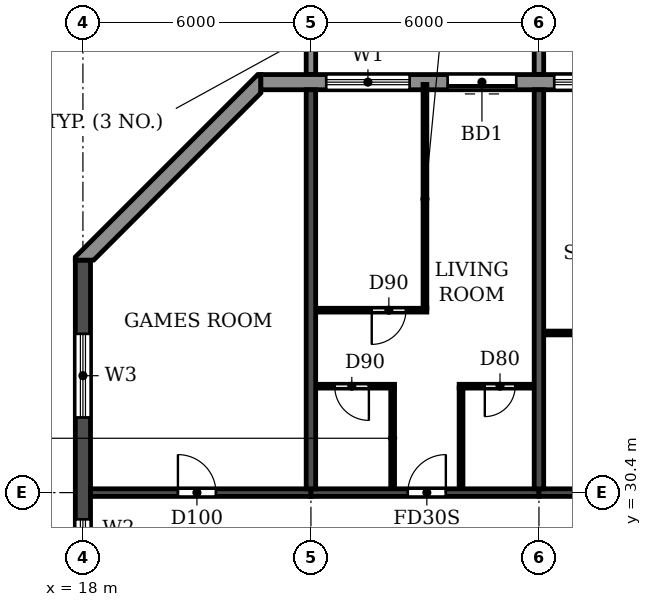
"""IFC4 building model, lengths in metres.
Left out: names, types, materials, properties, quantities, classifications, styles, units other than length and angle.
Written with IfcOpenShell. Run it as: python <this file> out.ifc"""

import sys

from ifc_helpers import new_model, si_unit, direction, frame, frame_2d, origin, place, context, subcontext, project, spatial, polyline, rectangle, outline, extrude, source, transform, mapped, element, fill, save


model = new_model("IFC4")
c1 = context("Model", 3, precision=1e-05, world=origin(), true_north=direction((0.0, 1.0)))
c2 = subcontext(c1, "Body", "Model", "MODEL_VIEW")
j1 = project(units=[si_unit("LENGTHUNIT", "METRE"), si_unit("PLANEANGLEUNIT", "RADIAN")], contexts=[c1])
p1 = place(None, origin())
s1 = spatial("IfcSite", under=j1, at=p1, CompositionType="ELEMENT")
p2 = place(p1, origin())
s2 = spatial("IfcBuilding", under=s1, at=p2, CompositionType="ELEMENT")
p3 = place(p2, frame((0.0, 0.0, 208.2)))
s3 = spatial("IfcBuildingStorey", under=s2, at=p3, CompositionType="ELEMENT", Elevation=208.2)
for number, where, z_axis, x_axis in (
    (1, (24.0, 30.5, 0.0), (0.0, 0.0, 1.0), (0.0, 1.0, 0.0)),
    (2, (30.0, 30.5, 0.0), (0.0, 0.0, 1.0), (0.0, 1.0, 0.0)),
):
    element("IfcWall", number, at=place(p3, frame(where, z_axis=z_axis, x_axis=x_axis)), inside=s3, PredefinedType="SHEAR", context=c2, shape_type="SweptSolid", body=[
        extrude(rectangle(XDim=10.5, YDim=0.25, at=frame_2d((5.25, 0.0))), origin(), (0.0, 0.0, 1.0), 3.0),
    ])
p4 = place(p3, frame((18.0, 4.683, 0.0), z_axis=(0.0, 0.0, 1.0), x_axis=(0.0, 1.0, 0.0)))
e3 = element("IfcWall", 3, at=p4, inside=s3, PredefinedType="SHEAR", context=c2, shape_type="SweptSolid", body=[
    extrude(rectangle(XDim=31.834, YDim=0.4, at=frame_2d((15.917, 0.0))), origin(), (0.0, 0.0, 1.0), 3.0),
])
p5 = place(p4, frame((23.817, 0.0, 0.9)))
e4 = element("IfcOpeningElement", 4, at=p5, cuts=e3, PredefinedType="OPENING", context=c2, shape_type="SweptSolid", body=[
    extrude(rectangle(XDim=1.2, YDim=1.5, at=frame_2d((0.6, 0.75))), frame((0.0, 0.21, 0.0), z_axis=(0.0, -1.0, 0.0), x_axis=(1.0, 0.0, 0.0)), (0.0, 0.0, 1.0), 0.42),
])
p6 = place(p4, frame((8.017, 0.0, 0.9)))
e5 = element("IfcOpeningElement", 5, at=p6, cuts=e3, PredefinedType="OPENING", context=c2, shape_type="SweptSolid", body=[
    extrude(rectangle(XDim=1.2, YDim=1.5, at=frame_2d((0.6, 0.75))), frame((0.0, 0.21, 0.0), z_axis=(0.0, -1.0, 0.0), x_axis=(1.0, 0.0, 0.0)), (0.0, 0.0, 1.0), 0.42),
])
p7 = place(p4, frame((27.694, 0.0, 0.6)))
e6 = element("IfcOpeningElement", 6, at=p7, cuts=e3, PredefinedType="OPENING", context=c2, shape_type="SweptSolid", body=[
    extrude(rectangle(XDim=2.2, YDim=1.8, at=frame_2d((1.1, 0.9))), frame((0.0, 0.21, 0.0), z_axis=(0.0, -1.0, 0.0), x_axis=(1.0, 0.0, 0.0)), (0.0, 0.0, 1.0), 0.42),
])
p8 = place(p4, frame((2.541, 0.0, 0.6)))
e7 = element("IfcOpeningElement", 7, at=p8, cuts=e3, PredefinedType="OPENING", context=c2, shape_type="SweptSolid", body=[
    extrude(rectangle(XDim=2.2, YDim=1.8, at=frame_2d((1.1, 0.9))), frame((0.0, 0.21, 0.0), z_axis=(0.0, -1.0, 0.0), x_axis=(1.0, 0.0, 0.0)), (0.0, 0.0, 1.0), 0.42),
])
p9 = place(p4, frame((15.917, 0.0, 0.9)))
e8 = element("IfcOpeningElement", 8, at=p9, cuts=e3, PredefinedType="OPENING", context=c2, shape_type="SweptSolid", body=[
    extrude(rectangle(XDim=1.2, YDim=1.5, at=frame_2d((0.6, 0.75))), frame((0.0, 0.21, 0.0), z_axis=(0.0, -1.0, 0.0), x_axis=(1.0, 0.0, 0.0)), (0.0, 0.0, 1.0), 0.42),
])
p10 = place(p3, frame((18.2, 30.4, 0.0), z_axis=(0.0, 0.0, 1.0), x_axis=(1.0, 0.0, 0.0)))
e9 = element("IfcWall", 9, at=p10, inside=s3, PredefinedType="SHEAR", context=c2, shape_type="SweptSolid", body=[
    extrude(rectangle(XDim=5.8, YDim=0.2, at=frame_2d((2.9, 0.0))), origin(), (0.0, 0.0, 1.0), 2.4),
])
p11 = place(p10, frame((2.3, 0.0, 0.0)))
e10 = element("IfcOpeningElement", 10, at=p11, cuts=e9, PredefinedType="OPENING", context=c2, shape_type="SweptSolid", body=[
    extrude(rectangle(XDim=1.0, YDim=2.1, at=frame_2d((0.5, 1.05))), frame((0.0, 0.11, 0.0), z_axis=(0.0, -1.0, 0.0), x_axis=(1.0, 0.0, 0.0)), (0.0, 0.0, 1.0), 0.22),
])
p12 = place(p3, frame((24.0, 30.4, 0.0), z_axis=(0.0, 0.0, 1.0), x_axis=(1.0, 0.0, 0.0)))
e11 = element("IfcWall", 11, at=p12, inside=s3, PredefinedType="SHEAR", context=c2, shape_type="SweptSolid", body=[
    extrude(rectangle(XDim=6.0, YDim=0.2, at=frame_2d((3.0, 0.0))), origin(), (0.0, 0.0, 1.0), 2.4),
])
p13 = place(p12, frame((2.55, 0.0, 0.0)))
e12 = element("IfcOpeningElement", 12, at=p13, cuts=e11, PredefinedType="OPENING", context=c2, shape_type="SweptSolid", body=[
    extrude(rectangle(XDim=1.0, YDim=2.1, at=frame_2d((0.5, 1.05))), frame((0.0, 0.11, 0.0), z_axis=(0.0, -1.0, 0.0), x_axis=(1.0, 0.0, 0.0)), (0.0, 0.0, 1.0), 0.22),
])
p14 = place(p3, frame((30.0, 30.4, 0.0), z_axis=(0.0, 0.0, 1.0), x_axis=(1.0, 0.0, 0.0)))
e13 = element("IfcWall", 13, at=p14, inside=s3, PredefinedType="SHEAR", context=c2, shape_type="SweptSolid", body=[
    extrude(rectangle(XDim=6.0, YDim=0.2, at=frame_2d((3.0, 0.0))), origin(), (0.0, 0.0, 1.0), 2.4),
])
p15 = place(p14, frame((2.45, 0.0, 0.0)))
e14 = element("IfcOpeningElement", 14, at=p15, cuts=e13, PredefinedType="OPENING", context=c2, shape_type="SweptSolid", body=[
    extrude(rectangle(XDim=1.0, YDim=2.1, at=frame_2d((0.5, 1.05))), frame((0.0, 0.11, 0.0), z_axis=(0.0, -1.0, 0.0), x_axis=(1.0, 0.0, 0.0)), (0.0, 0.0, 1.0), 0.22),
])
p16 = place(p3, frame((79.317, 41.2, 0.0), z_axis=(0.0, 0.0, 1.0), x_axis=(-1.0, 0.0, 0.0)))
e15 = element("IfcWall", 15, at=p16, inside=s3, PredefinedType="STANDARD", context=c2, shape_type="SweptSolid", body=[
    extrude(rectangle(XDim=56.634, YDim=0.4, at=frame_2d((28.317, 0.0))), origin(), (0.0, 0.0, 1.0), 3.0),
])
p17 = place(p16, frame((52.717, 0.0, 0.9)))
e16 = element("IfcOpeningElement", 16, at=p17, cuts=e15, PredefinedType="OPENING", context=c2, shape_type="SweptSolid", body=[
    extrude(rectangle(XDim=2.2, YDim=1.5, at=frame_2d((1.1, 0.75))), frame((0.0, 0.21, 0.0), z_axis=(0.0, -1.0, 0.0), x_axis=(1.0, 0.0, 0.0)), (0.0, 0.0, 1.0), 0.42),
])
p18 = place(p16, frame((49.917, 0.0, 0.0)))
e17 = element("IfcOpeningElement", 17, at=p18, cuts=e15, PredefinedType="OPENING", context=c2, shape_type="SweptSolid", body=[
    extrude(rectangle(XDim=1.8, YDim=2.4, at=frame_2d((0.9, 1.2))), frame((0.0, 0.21, 0.0), z_axis=(0.0, -1.0, 0.0), x_axis=(1.0, 0.0, 0.0)), (0.0, 0.0, 1.0), 0.42),
])
p19 = place(p16, frame((46.717, 0.0, 0.9)))
e18 = element("IfcOpeningElement", 18, at=p19, cuts=e15, PredefinedType="OPENING", context=c2, shape_type="SweptSolid", body=[
    extrude(rectangle(XDim=2.2, YDim=1.5, at=frame_2d((1.1, 0.75))), frame((0.0, 0.21, 0.0), z_axis=(0.0, -1.0, 0.0), x_axis=(1.0, 0.0, 0.0)), (0.0, 0.0, 1.0), 0.42),
])
p20 = place(p16, frame((43.917, 0.0, 0.0)))
e19 = element("IfcOpeningElement", 19, at=p20, cuts=e15, PredefinedType="OPENING", context=c2, shape_type="SweptSolid", body=[
    extrude(rectangle(XDim=1.8, YDim=2.4, at=frame_2d((0.9, 1.2))), frame((0.0, 0.21, 0.0), z_axis=(0.0, -1.0, 0.0), x_axis=(1.0, 0.0, 0.0)), (0.0, 0.0, 1.0), 0.42),
])
p21 = place(p16, frame((40.917, 0.0, 0.0)))
e20 = element("IfcOpeningElement", 20, at=p21, cuts=e15, PredefinedType="OPENING", context=c2, shape_type="SweptSolid", body=[
    extrude(rectangle(XDim=1.8, YDim=2.4, at=frame_2d((0.9, 1.2))), frame((0.0, 0.21, 0.0), z_axis=(0.0, -1.0, 0.0), x_axis=(1.0, 0.0, 0.0)), (0.0, 0.0, 1.0), 0.42),
])
p22 = place(p16, frame((37.717, 0.0, 0.9)))
e21 = element("IfcOpeningElement", 21, at=p22, cuts=e15, PredefinedType="OPENING", context=c2, shape_type="SweptSolid", body=[
    extrude(rectangle(XDim=2.2, YDim=1.5, at=frame_2d((1.1, 0.75))), frame((0.0, 0.21, 0.0), z_axis=(0.0, -1.0, 0.0), x_axis=(1.0, 0.0, 0.0)), (0.0, 0.0, 1.0), 0.42),
])
p23 = place(p16, frame((34.717, 0.0, 0.9)))
e22 = element("IfcOpeningElement", 22, at=p23, cuts=e15, PredefinedType="OPENING", context=c2, shape_type="SweptSolid", body=[
    extrude(rectangle(XDim=2.2, YDim=1.5, at=frame_2d((1.1, 0.75))), frame((0.0, 0.21, 0.0), z_axis=(0.0, -1.0, 0.0), x_axis=(1.0, 0.0, 0.0)), (0.0, 0.0, 1.0), 0.42),
])
p24 = place(p16, frame((31.717, 0.0, 0.9)))
e23 = element("IfcOpeningElement", 23, at=p24, cuts=e15, PredefinedType="OPENING", context=c2, shape_type="SweptSolid", body=[
    extrude(rectangle(XDim=2.2, YDim=1.5, at=frame_2d((1.1, 0.75))), frame((0.0, 0.21, 0.0), z_axis=(0.0, -1.0, 0.0), x_axis=(1.0, 0.0, 0.0)), (0.0, 0.0, 1.0), 0.42),
])
p25 = place(p16, frame((28.717, 0.0, 0.9)))
e24 = element("IfcOpeningElement", 24, at=p25, cuts=e15, PredefinedType="OPENING", context=c2, shape_type="SweptSolid", body=[
    extrude(rectangle(XDim=2.2, YDim=1.5, at=frame_2d((1.1, 0.75))), frame((0.0, 0.21, 0.0), z_axis=(0.0, -1.0, 0.0), x_axis=(1.0, 0.0, 0.0)), (0.0, 0.0, 1.0), 0.42),
])
p26 = place(p16, frame((25.917, 0.0, 0.0)))
e25 = element("IfcOpeningElement", 25, at=p26, cuts=e15, PredefinedType="OPENING", context=c2, shape_type="SweptSolid", body=[
    extrude(rectangle(XDim=1.8, YDim=2.4, at=frame_2d((0.9, 1.2))), frame((0.0, 0.21, 0.0), z_axis=(0.0, -1.0, 0.0), x_axis=(1.0, 0.0, 0.0)), (0.0, 0.0, 1.0), 0.42),
])
p27 = place(p16, frame((22.717, 0.0, 0.9)))
e26 = element("IfcOpeningElement", 26, at=p27, cuts=e15, PredefinedType="OPENING", context=c2, shape_type="SweptSolid", body=[
    extrude(rectangle(XDim=2.2, YDim=1.5, at=frame_2d((1.1, 0.75))), frame((0.0, 0.21, 0.0), z_axis=(0.0, -1.0, 0.0), x_axis=(1.0, 0.0, 0.0)), (0.0, 0.0, 1.0), 0.42),
])
p28 = place(p16, frame((19.717, 0.0, 0.9)))
e27 = element("IfcOpeningElement", 27, at=p28, cuts=e15, PredefinedType="OPENING", context=c2, shape_type="SweptSolid", body=[
    extrude(rectangle(XDim=2.2, YDim=1.5, at=frame_2d((1.1, 0.75))), frame((0.0, 0.21, 0.0), z_axis=(0.0, -1.0, 0.0), x_axis=(1.0, 0.0, 0.0)), (0.0, 0.0, 1.0), 0.42),
])
p29 = place(p16, frame((16.917, 0.0, 0.0)))
e28 = element("IfcOpeningElement", 28, at=p29, cuts=e15, PredefinedType="OPENING", context=c2, shape_type="SweptSolid", body=[
    extrude(rectangle(XDim=1.8, YDim=2.4, at=frame_2d((0.9, 1.2))), frame((0.0, 0.21, 0.0), z_axis=(0.0, -1.0, 0.0), x_axis=(1.0, 0.0, 0.0)), (0.0, 0.0, 1.0), 0.42),
])
p30 = place(p16, frame((13.717, 0.0, 0.9)))
e29 = element("IfcOpeningElement", 29, at=p30, cuts=e15, PredefinedType="OPENING", context=c2, shape_type="SweptSolid", body=[
    extrude(rectangle(XDim=2.2, YDim=1.5, at=frame_2d((1.1, 0.75))), frame((0.0, 0.21, 0.0), z_axis=(0.0, -1.0, 0.0), x_axis=(1.0, 0.0, 0.0)), (0.0, 0.0, 1.0), 0.42),
])
p31 = place(p16, frame((10.717, 0.0, 0.9)))
e30 = element("IfcOpeningElement", 30, at=p31, cuts=e15, PredefinedType="OPENING", context=c2, shape_type="SweptSolid", body=[
    extrude(rectangle(XDim=2.2, YDim=1.5, at=frame_2d((1.1, 0.75))), frame((0.0, 0.21, 0.0), z_axis=(0.0, -1.0, 0.0), x_axis=(1.0, 0.0, 0.0)), (0.0, 0.0, 1.0), 0.42),
])
p32 = place(p16, frame((7.717, 0.0, 0.9)))
e31 = element("IfcOpeningElement", 31, at=p32, cuts=e15, PredefinedType="OPENING", context=c2, shape_type="SweptSolid", body=[
    extrude(rectangle(XDim=2.2, YDim=1.5, at=frame_2d((1.1, 0.75))), frame((0.0, 0.21, 0.0), z_axis=(0.0, -1.0, 0.0), x_axis=(1.0, 0.0, 0.0)), (0.0, 0.0, 1.0), 0.42),
])
p33 = place(p16, frame((4.917, 0.0, 0.0)))
e32 = element("IfcOpeningElement", 32, at=p33, cuts=e15, PredefinedType="OPENING", context=c2, shape_type="SweptSolid", body=[
    extrude(rectangle(XDim=1.8, YDim=2.4, at=frame_2d((0.9, 1.2))), frame((0.0, 0.21, 0.0), z_axis=(0.0, -1.0, 0.0), x_axis=(1.0, 0.0, 0.0)), (0.0, 0.0, 1.0), 0.42),
])
p34 = place(p16, frame((1.717, 0.0, 0.9)))
e33 = element("IfcOpeningElement", 33, at=p34, cuts=e15, PredefinedType="OPENING", context=c2, shape_type="SweptSolid", body=[
    extrude(rectangle(XDim=2.2, YDim=1.5, at=frame_2d((1.1, 0.75))), frame((0.0, 0.21, 0.0), z_axis=(0.0, -1.0, 0.0), x_axis=(1.0, 0.0, 0.0)), (0.0, 0.0, 1.0), 0.42),
])
p35 = place(p3, origin())
e34 = element("IfcWall", 34, at=p35, inside=s3, PredefinedType="STANDARD", context=c2, shape_type="SweptSolid", body=[
    extrude(outline(polyline([(22.683, 41.4), (22.6, 41.4), (17.8, 36.6), (17.8, 36.517), (18.283, 36.517), (22.683, 40.917), (22.683, 41.4)])), origin(), (0.0, 0.0, 1.0), 3.0),
])
m1 = source(origin(), c2, "Body", "SweptSolid", [
    extrude(outline(polyline([(0.0, 0.0), (0.25, 0.0), (0.25, 3.1), (0.0, 3.1), (0.0, 0.0)])), origin(), (0.0, 0.0, 1.0), 3.1),
])
for number, where in (
    (35, (23.875, 41.4, 0.0)),
    (36, (29.875, 41.4, 0.0)),
):
    element("IfcWall", number, at=place(p3, frame(where)), inside=s3, PredefinedType="STANDARD", context=c2, shape_type="MappedRepresentation", body=[
        mapped(m1, transform((0.0, 0.0, 0.0))),
    ])
p36 = place(p3, frame((24.135, 33.2, 0.0), z_axis=(0.0, 0.0, 1.0), x_axis=(1.0, 0.0, 0.0)))
e37 = element("IfcWall", 37, at=p36, inside=s3, PredefinedType="PARTITIONING", context=c2, shape_type="SweptSolid", body=[
    extrude(rectangle(XDim=2.065, YDim=0.1, at=frame_2d((1.032, 0.0))), origin(), (0.0, 0.0, 1.0), 3.0),
])
p37 = place(p36, frame((0.49, 0.0, 0.0)))
e38 = element("IfcOpeningElement", 38, at=p37, cuts=e37, PredefinedType="OPENING", context=c2, shape_type="SweptSolid", body=[
    extrude(rectangle(XDim=0.9, YDim=2.1, at=frame_2d((0.45, 1.05))), frame((0.0, 0.06, 0.0), z_axis=(0.0, -1.0, 0.0), x_axis=(1.0, 0.0, 0.0)), (0.0, 0.0, 1.0), 0.12),
])
p38 = place(p3, frame((27.9, 33.2, 0.0), z_axis=(0.0, 0.0, 1.0), x_axis=(1.0, 0.0, 0.0)))
e39 = element("IfcWall", 39, at=p38, inside=s3, PredefinedType="PARTITIONING", context=c2, shape_type="SweptSolid", body=[
    extrude(rectangle(XDim=1.965, YDim=0.1, at=frame_2d((0.982, 0.0))), origin(), (0.0, 0.0, 1.0), 3.0),
])
p39 = place(p38, frame((0.675, 0.0, 0.0)))
e40 = element("IfcOpeningElement", 40, at=p39, cuts=e39, PredefinedType="OPENING", context=c2, shape_type="SweptSolid", body=[
    extrude(rectangle(XDim=0.8, YDim=2.1, at=frame_2d((0.4, 1.05))), frame((0.0, 0.06, 0.0), z_axis=(0.0, -1.0, 0.0), x_axis=(1.0, 0.0, 0.0)), (0.0, 0.0, 1.0), 0.12),
])
p40 = place(p3, frame((30.135, 34.6, 0.0), z_axis=(0.0, 0.0, 1.0), x_axis=(1.0, 0.0, 0.0)))
e41 = element("IfcWall", 41, at=p40, inside=s3, PredefinedType="PARTITIONING", context=c2, shape_type="SweptSolid", body=[
    extrude(rectangle(XDim=1.965, YDim=0.1, at=frame_2d((0.982, 0.0))), origin(), (0.0, 0.0, 1.0), 3.0),
])
p41 = place(p3, frame((24.135, 35.2, 0.0), z_axis=(0.0, 0.0, 1.0), x_axis=(1.0, 0.0, 0.0)))
e42 = element("IfcWall", 42, at=p41, inside=s3, PredefinedType="PARTITIONING", context=c2, shape_type="SweptSolid", body=[
    extrude(rectangle(XDim=2.915, YDim=0.1, at=frame_2d((1.458, 0.0))), origin(), (0.0, 0.0, 1.0), 3.0),
])
p42 = place(p41, frame((1.465, 0.0, 0.0)))
e43 = element("IfcOpeningElement", 43, at=p42, cuts=e42, PredefinedType="OPENING", context=c2, shape_type="SweptSolid", body=[
    extrude(rectangle(XDim=0.9, YDim=2.1, at=frame_2d((0.45, 1.05))), frame((0.0, 0.06, 0.0), z_axis=(0.0, -1.0, 0.0), x_axis=(1.0, 0.0, 0.0)), (0.0, 0.0, 1.0), 0.12),
])
p43 = place(p3, frame((26.15, 30.51, 0.0), z_axis=(0.0, 0.0, 1.0), x_axis=(0.0, 1.0, 0.0)))
e44 = element("IfcWall", 44, at=p43, inside=s3, PredefinedType="PARTITIONING", context=c2, shape_type="SweptSolid", body=[
    extrude(rectangle(XDim=2.64, YDim=0.1, at=frame_2d((1.32, 0.0))), origin(), (0.0, 0.0, 1.0), 3.0),
])
p44 = place(p3, frame((27.0, 35.25, 0.0), z_axis=(0.0, 0.0, 1.0), x_axis=(0.0, 1.0, 0.0)))
e45 = element("IfcWall", 45, at=p44, inside=s3, PredefinedType="PARTITIONING", context=c2, shape_type="SweptSolid", body=[
    extrude(rectangle(XDim=5.89, YDim=0.1, at=frame_2d((2.945, 0.0))), origin(), (0.0, 0.0, 1.0), 3.0),
])
p45 = place(p3, frame((27.95, 30.51, 0.0), z_axis=(0.0, 0.0, 1.0), x_axis=(0.0, 1.0, 0.0)))
e46 = element("IfcWall", 46, at=p45, inside=s3, PredefinedType="PARTITIONING", context=c2, shape_type="SweptSolid", body=[
    extrude(rectangle(XDim=2.64, YDim=0.1, at=frame_2d((1.32, 0.0))), origin(), (0.0, 0.0, 1.0), 3.0),
])
p46 = place(p17, origin())
e47 = element("IfcWindow", 47, at=p46, inside=s3, PartitioningType="DOUBLE_PANEL_HORIZONTAL", PredefinedType="WINDOW", context=c2, shape_type="SweptSolid", body=[
    extrude(rectangle(XDim=2.2, YDim=1.5, at=frame_2d((1.1, 0.75))), frame((0.0, 0.03, 0.0), z_axis=(0.0, -1.0, 0.0), x_axis=(1.0, 0.0, 0.0)), (0.0, 0.0, 1.0), 0.06),
])
fill(e16, e47)
p47 = place(p18, origin())
e48 = element("IfcDoor", 48, at=p47, inside=s3, OperationType="DOUBLE_DOOR_SLIDING", PredefinedType="DOOR", context=c2, shape_type="SweptSolid", body=[
    extrude(rectangle(XDim=1.8, YDim=2.4, at=frame_2d((0.9, 1.2))), frame((0.0, 0.025, 0.0), z_axis=(0.0, -1.0, 0.0), x_axis=(1.0, 0.0, 0.0)), (0.0, 0.0, 1.0), 0.05),
])
fill(e17, e48)
p48 = place(p19, origin())
e49 = element("IfcWindow", 49, at=p48, inside=s3, PartitioningType="DOUBLE_PANEL_HORIZONTAL", PredefinedType="WINDOW", context=c2, shape_type="SweptSolid", body=[
    extrude(rectangle(XDim=2.2, YDim=1.5, at=frame_2d((1.1, 0.75))), frame((0.0, 0.03, 0.0), z_axis=(0.0, -1.0, 0.0), x_axis=(1.0, 0.0, 0.0)), (0.0, 0.0, 1.0), 0.06),
])
fill(e18, e49)
p49 = place(p5, origin())
e50 = element("IfcWindow", 50, at=p49, inside=s3, PartitioningType="SINGLE_PANEL", PredefinedType="WINDOW", context=c2, shape_type="SweptSolid", body=[
    extrude(rectangle(XDim=1.2, YDim=1.5, at=frame_2d((0.6, 0.75))), frame((0.0, 0.03, 0.0), z_axis=(0.0, -1.0, 0.0), x_axis=(1.0, 0.0, 0.0)), (0.0, 0.0, 1.0), 0.06),
])
fill(e4, e50)
p50 = place(p7, origin())
e51 = element("IfcWindow", 51, at=p50, inside=s3, PartitioningType="DOUBLE_PANEL_HORIZONTAL", PredefinedType="WINDOW", context=c2, shape_type="SweptSolid", body=[
    extrude(rectangle(XDim=2.2, YDim=1.8, at=frame_2d((1.1, 0.9))), frame((0.0, 0.03, 0.0), z_axis=(0.0, -1.0, 0.0), x_axis=(1.0, 0.0, 0.0)), (0.0, 0.0, 1.0), 0.06),
])
fill(e6, e51)
p51 = place(p11, origin())
e52 = element("IfcDoor", 52, at=p51, inside=s3, OperationType="SINGLE_SWING_LEFT", PredefinedType="DOOR", context=c2, shape_type="SweptSolid", body=[
    extrude(rectangle(XDim=1.0, YDim=2.1, at=frame_2d((0.5, 1.05))), frame((0.0, 0.025, 0.0), z_axis=(0.0, -1.0, 0.0), x_axis=(1.0, 0.0, 0.0)), (0.0, 0.0, 1.0), 0.05),
])
fill(e10, e52)
p52 = place(p37, frame((0.9, 0.0, 0.0), z_axis=(0.0, 0.0, 1.0), x_axis=(-1.0, 0.0, 0.0)))
e53 = element("IfcDoor", 53, at=p52, inside=s3, OperationType="SINGLE_SWING_LEFT", PredefinedType="DOOR", context=c2, shape_type="SweptSolid", body=[
    extrude(rectangle(XDim=0.9, YDim=2.1, at=frame_2d((0.45, 1.05))), frame((0.0, 0.025, 0.0), z_axis=(0.0, -1.0, 0.0), x_axis=(1.0, 0.0, 0.0)), (0.0, 0.0, 1.0), 0.05),
])
fill(e38, e53)
p53 = place(p42, frame((0.9, 0.0, 0.0), z_axis=(0.0, 0.0, 1.0), x_axis=(-1.0, 0.0, 0.0)))
e54 = element("IfcDoor", 54, at=p53, inside=s3, OperationType="SINGLE_SWING_RIGHT", PredefinedType="DOOR", context=c2, shape_type="SweptSolid", body=[
    extrude(rectangle(XDim=0.9, YDim=2.1, at=frame_2d((0.45, 1.05))), frame((0.0, 0.025, 0.0), z_axis=(0.0, -1.0, 0.0), x_axis=(1.0, 0.0, 0.0)), (0.0, 0.0, 1.0), 0.05),
])
fill(e43, e54)
p54 = place(p13, origin())
e55 = element("IfcDoor", 55, at=p54, inside=s3, OperationType="SINGLE_SWING_RIGHT", PredefinedType="DOOR", context=c2, shape_type="SweptSolid", body=[
    extrude(rectangle(XDim=1.0, YDim=2.1, at=frame_2d((0.5, 1.05))), frame((0.0, 0.025, 0.0), z_axis=(0.0, -1.0, 0.0), x_axis=(1.0, 0.0, 0.0)), (0.0, 0.0, 1.0), 0.05),
])
fill(e12, e55)
p55 = place(p39, frame((0.8, 0.0, 0.0), z_axis=(0.0, 0.0, 1.0), x_axis=(-1.0, 0.0, 0.0)))
e56 = element("IfcDoor", 56, at=p55, inside=s3, OperationType="SINGLE_SWING_RIGHT", PredefinedType="DOOR", context=c2, shape_type="SweptSolid", body=[
    extrude(rectangle(XDim=0.8, YDim=2.1, at=frame_2d((0.4, 1.05))), frame((0.0, 0.025, 0.0), z_axis=(0.0, -1.0, 0.0), x_axis=(1.0, 0.0, 0.0)), (0.0, 0.0, 1.0), 0.05),
])
fill(e40, e56)
save(model, sys.argv[1])
